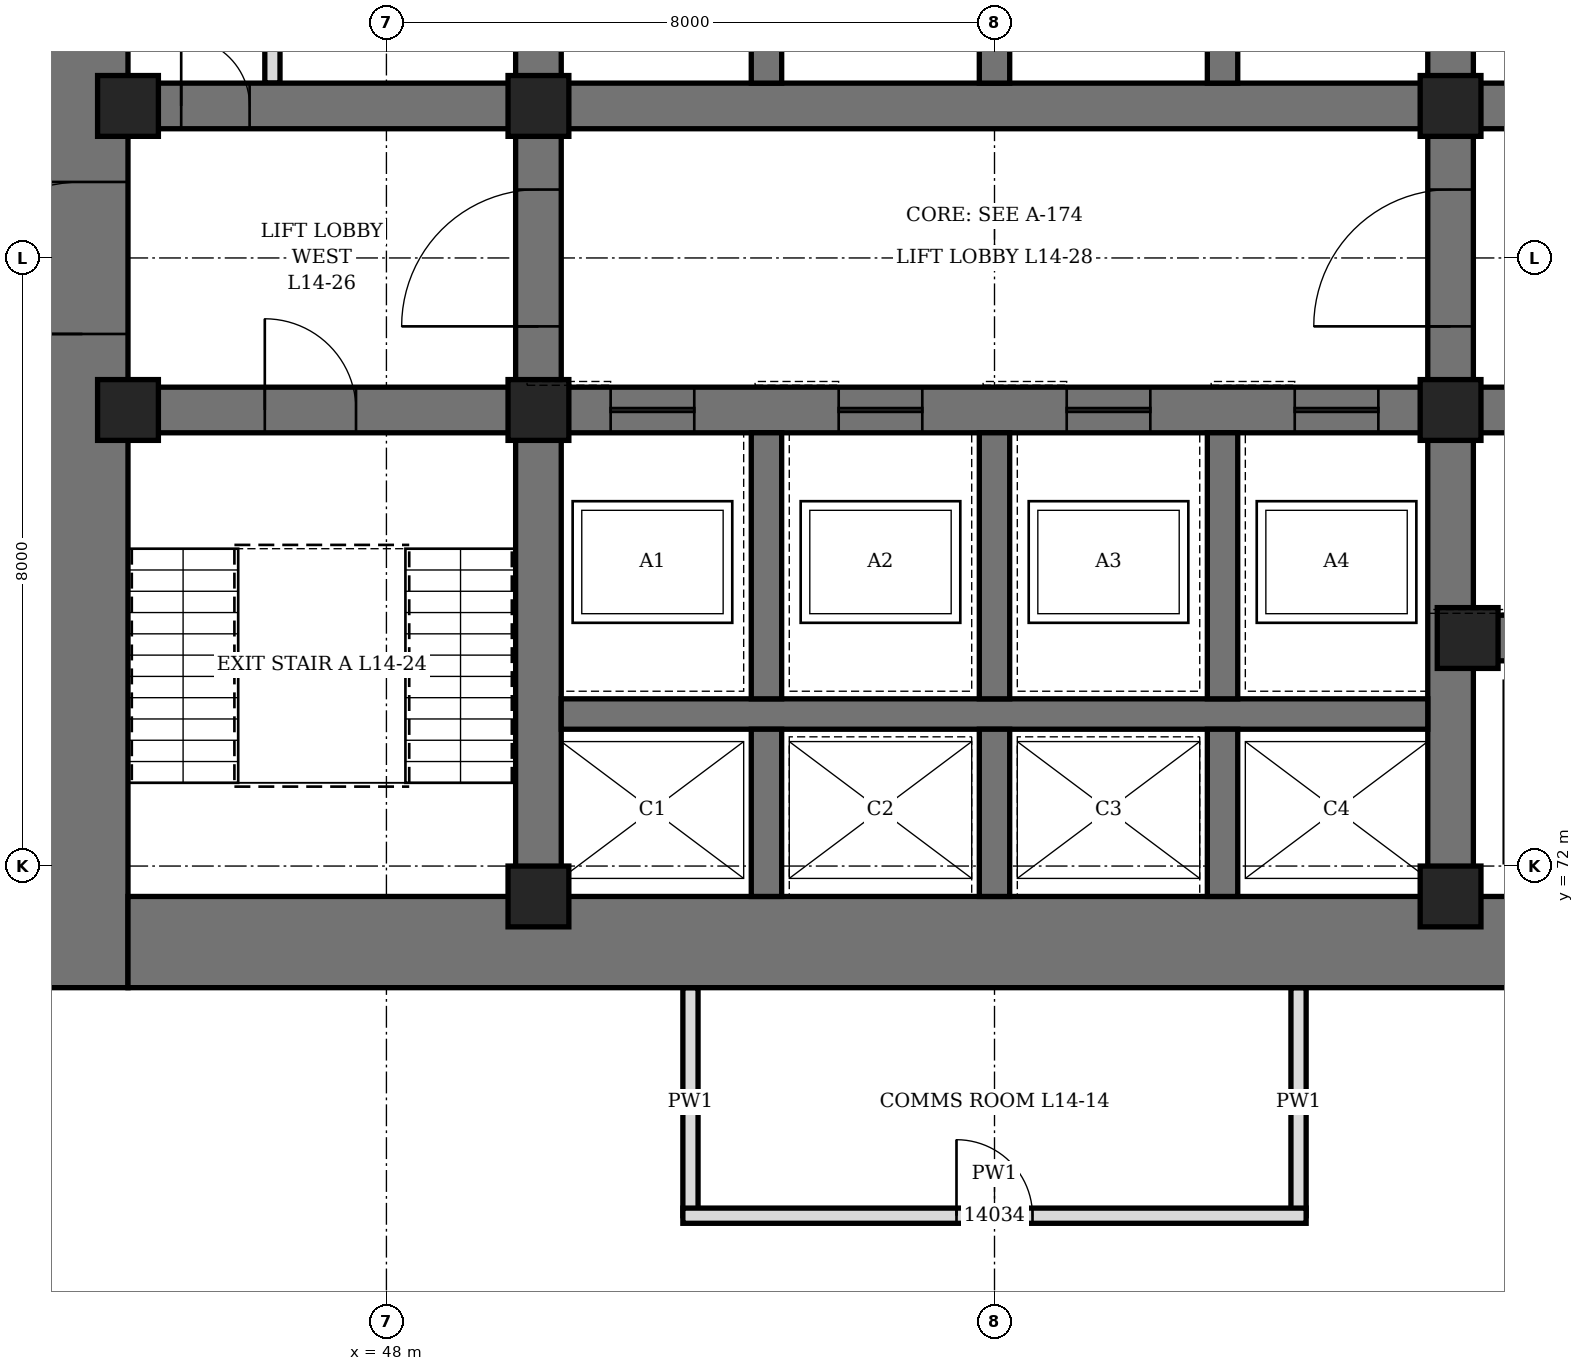
"""IFC4 building model, lengths in metres.
Left out: names, types, materials, properties, quantities, classifications, styles, units other than length and angle.
Written with IfcOpenShell. Run it as: python <this file> out.ifc"""

import sys

from ifc_helpers import new_model, si_unit, direction, frame, frame_2d, origin, origin_2d, place, context, subcontext, project, spatial, rectangle, hollow_rectangle, extrude, element, fill, save


model = new_model("IFC4")
c1 = context("Model", 3, precision=1e-05, world=origin(), true_north=direction((0.0, 1.0)))
c2 = subcontext(c1, "Body", "Model", "MODEL_VIEW")
j1 = project(units=[si_unit("LENGTHUNIT", "METRE"), si_unit("PLANEANGLEUNIT", "RADIAN")], contexts=[c1])
p1 = place(None, origin())
s1 = spatial("IfcSite", under=j1, at=p1, CompositionType="ELEMENT")
p2 = place(p1, origin())
s2 = spatial("IfcBuilding", under=s1, at=p2, CompositionType="ELEMENT")
p3 = place(p2, frame((0.0, 0.0, 68.5)))
s3 = spatial("IfcBuildingStorey", under=s2, at=p3, CompositionType="ELEMENT", Elevation=68.5)
p4 = place(p3, frame((44.0, 70.4, 0.0), z_axis=(0.0, 0.0, 1.0), x_axis=(0.0, 1.0, 0.0)))
e1 = element("IfcWall", 1, at=p4, inside=s3, PredefinedType="SHEAR", context=c2, shape_type="SweptSolid", body=[
    extrude(rectangle(XDim=19.2, YDim=1.2, at=frame_2d((9.6, 0.0))), origin(), (0.0, 0.0, 1.0), 4.2),
])
p5 = place(p4, frame((8.6, 0.0, 0.0)))
e2 = element("IfcOpeningElement", 2, at=p5, cuts=e1, PredefinedType="OPENING", context=c2, shape_type="SweptSolid", body=[
    extrude(rectangle(XDim=2.0, YDim=2.4, at=frame_2d((1.0, 1.2))), frame((0.0, 0.61, 0.0), z_axis=(0.0, -1.0, 0.0), x_axis=(1.0, 0.0, 0.0)), (0.0, 0.0, 1.0), 1.22),
])
p6 = place(p3, frame((44.6, 71.0, 0.0), z_axis=(0.0, 0.0, 1.0), x_axis=(1.0, 0.0, 0.0)))
e3 = element("IfcWall", 3, at=p6, inside=s3, PredefinedType="SHEAR", context=c2, shape_type="SweptSolid", body=[
    extrude(rectangle(XDim=22.8, YDim=1.2, at=frame_2d((11.4, 0.0))), origin(), (0.0, 0.0, 1.0), 4.2),
])
p7 = place(p3, frame((50.0, 71.6, 0.0), z_axis=(0.0, 0.0, 1.0), x_axis=(0.0, 1.0, 0.0)))
e4 = element("IfcWall", 4, at=p7, inside=s3, PredefinedType="SHEAR", context=c2, shape_type="SweptSolid", body=[
    extrude(rectangle(XDim=16.8, YDim=0.6, at=frame_2d((8.4, 0.0))), origin(), (0.0, 0.0, 1.0), 4.2),
])
p8 = place(p7, frame((7.5, 0.0, 0.0)))
e5 = element("IfcOpeningElement", 5, at=p8, cuts=e4, PredefinedType="OPENING", context=c2, shape_type="SweptSolid", body=[
    extrude(rectangle(XDim=1.8, YDim=2.4, at=frame_2d((0.9, 1.2))), frame((0.0, 0.31, 0.0), z_axis=(0.0, -1.0, 0.0), x_axis=(1.0, 0.0, 0.0)), (0.0, 0.0, 1.0), 0.62),
])
p9 = place(p3, frame((62.0, 71.6, 0.0), z_axis=(0.0, 0.0, 1.0), x_axis=(0.0, 1.0, 0.0)))
e6 = element("IfcWall", 6, at=p9, inside=s3, PredefinedType="SHEAR", context=c2, shape_type="SweptSolid", body=[
    extrude(rectangle(XDim=16.8, YDim=0.6, at=frame_2d((8.4, 0.0))), origin(), (0.0, 0.0, 1.0), 4.2),
])
p10 = place(p9, frame((7.5, 0.0, 0.0)))
e7 = element("IfcOpeningElement", 7, at=p10, cuts=e6, PredefinedType="OPENING", context=c2, shape_type="SweptSolid", body=[
    extrude(rectangle(XDim=1.8, YDim=2.4, at=frame_2d((0.9, 1.2))), frame((0.0, 0.31, 0.0), z_axis=(0.0, -1.0, 0.0), x_axis=(1.0, 0.0, 0.0)), (0.0, 0.0, 1.0), 0.62),
])
p11 = place(p3, frame((44.6, 78.0, 0.0), z_axis=(0.0, 0.0, 1.0), x_axis=(1.0, 0.0, 0.0)))
e8 = element("IfcWall", 8, at=p11, inside=s3, PredefinedType="SHEAR", context=c2, shape_type="SweptSolid", body=[
    extrude(rectangle(XDim=5.1, YDim=0.6, at=frame_2d((2.55, 0.0))), origin(), (0.0, 0.0, 1.0), 4.2),
])
p12 = place(p11, frame((1.8, 0.0, 0.0)))
e9 = element("IfcOpeningElement", 9, at=p12, cuts=e8, PredefinedType="OPENING", context=c2, shape_type="SweptSolid", body=[
    extrude(rectangle(XDim=1.2, YDim=2.1, at=frame_2d((0.6, 1.05))), frame((0.0, 0.31, 0.0), z_axis=(0.0, -1.0, 0.0), x_axis=(1.0, 0.0, 0.0)), (0.0, 0.0, 1.0), 0.62),
])
p13 = place(p3, frame((44.6, 82.0, 0.0), z_axis=(0.0, 0.0, 1.0), x_axis=(1.0, 0.0, 0.0)))
e10 = element("IfcWall", 10, at=p13, inside=s3, PredefinedType="SHEAR", context=c2, shape_type="SweptSolid", body=[
    extrude(rectangle(XDim=5.1, YDim=0.6, at=frame_2d((2.55, 0.0))), origin(), (0.0, 0.0, 1.0), 4.2),
])
p14 = place(p13, frame((0.7, 0.0, 0.0)))
e11 = element("IfcOpeningElement", 11, at=p14, cuts=e10, PredefinedType="OPENING", context=c2, shape_type="SweptSolid", body=[
    extrude(rectangle(XDim=0.9, YDim=2.1, at=frame_2d((0.45, 1.05))), frame((0.0, 0.31, 0.0), z_axis=(0.0, -1.0, 0.0), x_axis=(1.0, 0.0, 0.0)), (0.0, 0.0, 1.0), 0.62),
])
p15 = place(p3, frame((62.3, 75.0, 0.0), z_axis=(0.0, 0.0, 1.0), x_axis=(1.0, 0.0, 0.0)))
e12 = element("IfcWall", 12, at=p15, inside=s3, PredefinedType="SHEAR", context=c2, shape_type="SweptSolid", body=[
    extrude(rectangle(XDim=5.1, YDim=0.6, at=frame_2d((2.55, 0.0))), origin(), (0.0, 0.0, 1.0), 4.2),
])
p16 = place(p15, frame((0.6, 0.0, 0.0)))
e13 = element("IfcOpeningElement", 13, at=p16, cuts=e12, PredefinedType="OPENING", context=c2, shape_type="SweptSolid", body=[
    extrude(rectangle(XDim=1.2, YDim=2.2, at=frame_2d((0.6, 1.1))), frame((0.0, 0.31, 0.0), z_axis=(0.0, -1.0, 0.0), x_axis=(1.0, 0.0, 0.0)), (0.0, 0.0, 1.0), 0.62),
])
p17 = place(p15, frame((3.35, 0.0, 0.0)))
e14 = element("IfcOpeningElement", 14, at=p17, cuts=e12, PredefinedType="OPENING", context=c2, shape_type="SweptSolid", body=[
    extrude(rectangle(XDim=1.2, YDim=2.2, at=frame_2d((0.6, 1.1))), frame((0.0, 0.31, 0.0), z_axis=(0.0, -1.0, 0.0), x_axis=(1.0, 0.0, 0.0)), (0.0, 0.0, 1.0), 0.62),
])
p18 = place(p3, frame((62.3, 78.0, 0.0), z_axis=(0.0, 0.0, 1.0), x_axis=(1.0, 0.0, 0.0)))
e15 = element("IfcWall", 15, at=p18, inside=s3, PredefinedType="SHEAR", context=c2, shape_type="SweptSolid", body=[
    extrude(rectangle(XDim=5.1, YDim=0.6, at=frame_2d((2.55, 0.0))), origin(), (0.0, 0.0, 1.0), 4.2),
])
p19 = place(p18, frame((2.1, 0.0, 0.0)))
e16 = element("IfcOpeningElement", 16, at=p19, cuts=e15, PredefinedType="OPENING", context=c2, shape_type="SweptSolid", body=[
    extrude(rectangle(XDim=1.2, YDim=2.1, at=frame_2d((0.6, 1.05))), frame((0.0, 0.31, 0.0), z_axis=(0.0, -1.0, 0.0), x_axis=(1.0, 0.0, 0.0)), (0.0, 0.0, 1.0), 0.62),
])
p20 = place(p3, frame((62.3, 82.0, 0.0), z_axis=(0.0, 0.0, 1.0), x_axis=(1.0, 0.0, 0.0)))
e17 = element("IfcWall", 17, at=p20, inside=s3, PredefinedType="SHEAR", context=c2, shape_type="SweptSolid", body=[
    extrude(rectangle(XDim=5.1, YDim=0.6, at=frame_2d((2.55, 0.0))), origin(), (0.0, 0.0, 1.0), 4.2),
])
p21 = place(p20, frame((2.1, 0.0, 0.0)))
e18 = element("IfcOpeningElement", 18, at=p21, cuts=e17, PredefinedType="OPENING", context=c2, shape_type="SweptSolid", body=[
    extrude(rectangle(XDim=1.2, YDim=2.1, at=frame_2d((0.6, 1.05))), frame((0.0, 0.31, 0.0), z_axis=(0.0, -1.0, 0.0), x_axis=(1.0, 0.0, 0.0)), (0.0, 0.0, 1.0), 0.62),
])
p22 = place(p3, frame((50.3, 78.0, 0.0), z_axis=(0.0, 0.0, 1.0), x_axis=(1.0, 0.0, 0.0)))
e19 = element("IfcWall", 19, at=p22, inside=s3, PredefinedType="SHEAR", context=c2, shape_type="SweptSolid", body=[
    extrude(rectangle(XDim=11.4, YDim=0.6, at=frame_2d((5.7, 0.0))), origin(), (0.0, 0.0, 1.0), 4.2),
])
p23 = place(p22, frame((0.65, 0.0, 0.0)))
e20 = element("IfcOpeningElement", 20, at=p23, cuts=e19, PredefinedType="OPENING", context=c2, shape_type="SweptSolid", body=[
    extrude(rectangle(XDim=1.1, YDim=2.2, at=frame_2d((0.55, 1.1))), frame((0.0, 0.31, 0.0), z_axis=(0.0, -1.0, 0.0), x_axis=(1.0, 0.0, 0.0)), (0.0, 0.0, 1.0), 0.62),
])
p24 = place(p22, frame((3.65, 0.0, 0.0)))
e21 = element("IfcOpeningElement", 21, at=p24, cuts=e19, PredefinedType="OPENING", context=c2, shape_type="SweptSolid", body=[
    extrude(rectangle(XDim=1.1, YDim=2.2, at=frame_2d((0.55, 1.1))), frame((0.0, 0.31, 0.0), z_axis=(0.0, -1.0, 0.0), x_axis=(1.0, 0.0, 0.0)), (0.0, 0.0, 1.0), 0.62),
])
p25 = place(p22, frame((6.65, 0.0, 0.0)))
e22 = element("IfcOpeningElement", 22, at=p25, cuts=e19, PredefinedType="OPENING", context=c2, shape_type="SweptSolid", body=[
    extrude(rectangle(XDim=1.1, YDim=2.2, at=frame_2d((0.55, 1.1))), frame((0.0, 0.31, 0.0), z_axis=(0.0, -1.0, 0.0), x_axis=(1.0, 0.0, 0.0)), (0.0, 0.0, 1.0), 0.62),
])
p26 = place(p22, frame((9.65, 0.0, 0.0)))
e23 = element("IfcOpeningElement", 23, at=p26, cuts=e19, PredefinedType="OPENING", context=c2, shape_type="SweptSolid", body=[
    extrude(rectangle(XDim=1.1, YDim=2.2, at=frame_2d((0.55, 1.1))), frame((0.0, 0.31, 0.0), z_axis=(0.0, -1.0, 0.0), x_axis=(1.0, 0.0, 0.0)), (0.0, 0.0, 1.0), 0.62),
])
p27 = place(p3, frame((50.3, 82.0, 0.0), z_axis=(0.0, 0.0, 1.0), x_axis=(1.0, 0.0, 0.0)))
e24 = element("IfcWall", 24, at=p27, inside=s3, PredefinedType="SHEAR", context=c2, shape_type="SweptSolid", body=[
    extrude(rectangle(XDim=11.4, YDim=0.6, at=frame_2d((5.7, 0.0))), origin(), (0.0, 0.0, 1.0), 4.2),
])
p28 = place(p3, frame((50.3, 74.0, 0.0), z_axis=(0.0, 0.0, 1.0), x_axis=(1.0, 0.0, 0.0)))
e25 = element("IfcWall", 25, at=p28, inside=s3, PredefinedType="SHEAR", context=c2, shape_type="SweptSolid", body=[
    extrude(rectangle(XDim=11.4, YDim=0.4, at=frame_2d((5.7, 0.0))), origin(), (0.0, 0.0, 1.0), 4.2),
])
p29 = place(p3, frame((53.0, 71.6, 0.0), z_axis=(0.0, 0.0, 1.0), x_axis=(0.0, 1.0, 0.0)))
e26 = element("IfcWall", 26, at=p29, inside=s3, PredefinedType="SHEAR", context=c2, shape_type="SweptSolid", body=[
    extrude(rectangle(XDim=2.2, YDim=0.4, at=frame_2d((1.1, 0.0))), origin(), (0.0, 0.0, 1.0), 4.2),
])
p30 = place(p3, frame((53.0, 74.2, 0.0), z_axis=(0.0, 0.0, 1.0), x_axis=(0.0, 1.0, 0.0)))
e27 = element("IfcWall", 27, at=p30, inside=s3, PredefinedType="SHEAR", context=c2, shape_type="SweptSolid", body=[
    extrude(rectangle(XDim=3.5, YDim=0.4, at=frame_2d((1.75, 0.0))), origin(), (0.0, 0.0, 1.0), 4.2),
])
p31 = place(p3, frame((53.0, 82.3, 0.0), z_axis=(0.0, 0.0, 1.0), x_axis=(0.0, 1.0, 0.0)))
e28 = element("IfcWall", 28, at=p31, inside=s3, PredefinedType="SHEAR", context=c2, shape_type="SweptSolid", body=[
    extrude(rectangle(XDim=3.4, YDim=0.4, at=frame_2d((1.7, 0.0))), origin(), (0.0, 0.0, 1.0), 4.2),
])
p32 = place(p3, frame((56.0, 71.6, 0.0), z_axis=(0.0, 0.0, 1.0), x_axis=(0.0, 1.0, 0.0)))
e29 = element("IfcWall", 29, at=p32, inside=s3, PredefinedType="SHEAR", context=c2, shape_type="SweptSolid", body=[
    extrude(rectangle(XDim=2.2, YDim=0.4, at=frame_2d((1.1, 0.0))), origin(), (0.0, 0.0, 1.0), 4.2),
])
p33 = place(p3, frame((56.0, 74.2, 0.0), z_axis=(0.0, 0.0, 1.0), x_axis=(0.0, 1.0, 0.0)))
e30 = element("IfcWall", 30, at=p33, inside=s3, PredefinedType="SHEAR", context=c2, shape_type="SweptSolid", body=[
    extrude(rectangle(XDim=3.5, YDim=0.4, at=frame_2d((1.75, 0.0))), origin(), (0.0, 0.0, 1.0), 4.2),
])
p34 = place(p3, frame((56.0, 82.3, 0.0), z_axis=(0.0, 0.0, 1.0), x_axis=(0.0, 1.0, 0.0)))
e31 = element("IfcWall", 31, at=p34, inside=s3, PredefinedType="SHEAR", context=c2, shape_type="SweptSolid", body=[
    extrude(rectangle(XDim=3.4, YDim=0.4, at=frame_2d((1.7, 0.0))), origin(), (0.0, 0.0, 1.0), 4.2),
])
p35 = place(p3, frame((59.0, 71.6, 0.0), z_axis=(0.0, 0.0, 1.0), x_axis=(0.0, 1.0, 0.0)))
e32 = element("IfcWall", 32, at=p35, inside=s3, PredefinedType="SHEAR", context=c2, shape_type="SweptSolid", body=[
    extrude(rectangle(XDim=2.2, YDim=0.4, at=frame_2d((1.1, 0.0))), origin(), (0.0, 0.0, 1.0), 4.2),
])
p36 = place(p3, frame((59.0, 74.2, 0.0), z_axis=(0.0, 0.0, 1.0), x_axis=(0.0, 1.0, 0.0)))
e33 = element("IfcWall", 33, at=p36, inside=s3, PredefinedType="SHEAR", context=c2, shape_type="SweptSolid", body=[
    extrude(rectangle(XDim=3.5, YDim=0.4, at=frame_2d((1.75, 0.0))), origin(), (0.0, 0.0, 1.0), 4.2),
])
p37 = place(p3, frame((59.0, 82.3, 0.0), z_axis=(0.0, 0.0, 1.0), x_axis=(0.0, 1.0, 0.0)))
e34 = element("IfcWall", 34, at=p37, inside=s3, PredefinedType="SHEAR", context=c2, shape_type="SweptSolid", body=[
    extrude(rectangle(XDim=3.4, YDim=0.4, at=frame_2d((1.7, 0.0))), origin(), (0.0, 0.0, 1.0), 4.2),
])
for number, where, z_axis, x_axis in (
    (35, (44.6, 78.0, 0.0), (0.0, 0.0, 1.0), (1.0, 0.0, 0.0)),
    (36, (44.6, 82.0, 0.0), (0.0, 0.0, 1.0), (1.0, 0.0, 0.0)),
    (37, (50.0, 71.6, 0.0), (0.0, 0.0, 1.0), (1.0, 0.0, 0.0)),
    (38, (50.0, 78.0, 0.0), (0.0, 0.0, 1.0), (1.0, 0.0, 0.0)),
    (39, (50.0, 82.0, 0.0), (0.0, 0.0, 1.0), (1.0, 0.0, 0.0)),
    (40, (62.0, 71.6, 0.0), (0.0, 0.0, 1.0), (1.0, 0.0, 0.0)),
    (41, (62.0, 78.0, 0.0), (0.0, 0.0, 1.0), (1.0, 0.0, 0.0)),
    (42, (62.0, 82.0, 0.0), (0.0, 0.0, 1.0), (1.0, 0.0, 0.0)),
    (43, (62.225, 75.0, 0.0), (0.0, 0.0, 1.0), (1.0, 0.0, 0.0)),
):
    element("IfcColumn", number, at=place(p3, frame(where, z_axis=z_axis, x_axis=x_axis)), inside=s3, PredefinedType="COLUMN", context=c2, shape_type="SweptSolid", body=[
        extrude(hollow_rectangle(XDim=0.8, YDim=0.8, WallThickness=0.1, at=origin_2d()), origin(), (0.0, 0.0, 1.0), 4.2),
    ])
p38 = place(p3, frame((46.5, 82.3, 0.0), z_axis=(0.0, 0.0, 1.0), x_axis=(0.0, 1.0, 0.0)))
e44 = element("IfcWall", 44, at=p38, inside=s3, PredefinedType="PARTITIONING", context=c2, shape_type="SweptSolid", body=[
    extrude(rectangle(XDim=2.9, YDim=0.2, at=frame_2d((1.45, 0.0))), origin(), (0.0, 0.0, 1.0), 4.04),
])
p39 = place(p38, frame((1.0, 0.0, 0.0)))
e45 = element("IfcOpeningElement", 45, at=p39, cuts=e44, PredefinedType="OPENING", context=c2, shape_type="SweptSolid", body=[
    extrude(rectangle(XDim=0.9, YDim=2.1, at=frame_2d((0.45, 1.05))), frame((0.0, 0.11, 0.0), z_axis=(0.0, -1.0, 0.0), x_axis=(1.0, 0.0, 0.0)), (0.0, 0.0, 1.0), 0.22),
])
for number, where, z_axis, x_axis in (
    (46, (52.0, 67.4, 0.0), (0.0, 0.0, 1.0), (0.0, 1.0, 0.0)),
    (47, (60.0, 67.4, 0.0), (0.0, 0.0, 1.0), (0.0, 1.0, 0.0)),
):
    element("IfcWall", number, at=place(p3, frame(where, z_axis=z_axis, x_axis=x_axis)), inside=s3, PredefinedType="PARTITIONING", context=c2, shape_type="SweptSolid", body=[
        extrude(rectangle(XDim=3.0, YDim=0.2, at=frame_2d((1.5, 0.0))), origin(), (0.0, 0.0, 1.0), 4.04),
    ])
p40 = place(p3, frame((51.9, 67.4, 0.0), z_axis=(0.0, 0.0, 1.0), x_axis=(1.0, 0.0, 0.0)))
e48 = element("IfcWall", 48, at=p40, inside=s3, PredefinedType="PARTITIONING", context=c2, shape_type="SweptSolid", body=[
    extrude(rectangle(XDim=8.2, YDim=0.2, at=frame_2d((4.1, 0.0))), origin(), (0.0, 0.0, 1.0), 4.04),
])
p41 = place(p40, frame((3.6, 0.0, 0.0)))
e49 = element("IfcOpeningElement", 49, at=p41, cuts=e48, PredefinedType="OPENING", context=c2, shape_type="SweptSolid", body=[
    extrude(rectangle(XDim=1.0, YDim=2.1, at=frame_2d((0.5, 1.05))), frame((0.0, 0.11, 0.0), z_axis=(0.0, -1.0, 0.0), x_axis=(1.0, 0.0, 0.0)), (0.0, 0.0, 1.0), 0.22),
])
p42 = place(p14, origin())
e50 = element("IfcDoor", 50, at=p42, inside=s3, OperationType="SINGLE_SWING_LEFT", PredefinedType="DOOR", context=c2, shape_type="SweptSolid", body=[
    extrude(rectangle(XDim=0.9, YDim=2.1, at=frame_2d((0.45, 1.05))), frame((0.0, 0.3, 0.0), z_axis=(0.0, -1.0, 0.0), x_axis=(1.0, 0.0, 0.0)), (0.0, 0.0, 1.0), 0.6),
])
fill(e11, e50)
p43 = place(p12, origin())
e51 = element("IfcDoor", 51, at=p43, inside=s3, OperationType="SINGLE_SWING_LEFT", PredefinedType="DOOR", context=c2, shape_type="SweptSolid", body=[
    extrude(rectangle(XDim=1.2, YDim=2.1, at=frame_2d((0.6, 1.05))), frame((0.0, 0.3, 0.0), z_axis=(0.0, -1.0, 0.0), x_axis=(1.0, 0.0, 0.0)), (0.0, 0.0, 1.0), 0.6),
])
fill(e9, e51)
p44 = place(p5, origin())
e52 = element("IfcDoor", 52, at=p44, inside=s3, OperationType="DOUBLE_DOOR_SINGLE_SWING", PredefinedType="DOOR", context=c2, shape_type="SweptSolid", body=[
    extrude(rectangle(XDim=2.0, YDim=2.4, at=frame_2d((1.0, 1.2))), frame((0.0, 0.35, 0.0), z_axis=(0.0, -1.0, 0.0), x_axis=(1.0, 0.0, 0.0)), (0.0, 0.0, 1.0), 0.7),
])
fill(e2, e52)
p45 = place(p8, origin())
e53 = element("IfcDoor", 53, at=p45, inside=s3, OperationType="DOUBLE_DOOR_SINGLE_SWING", PredefinedType="DOOR", context=c2, shape_type="SweptSolid", body=[
    extrude(rectangle(XDim=1.8, YDim=2.4, at=frame_2d((0.9, 1.2))), frame((0.0, 0.3, 0.0), z_axis=(0.0, -1.0, 0.0), x_axis=(1.0, 0.0, 0.0)), (0.0, 0.0, 1.0), 0.6),
])
fill(e5, e53)
p46 = place(p10, origin())
e54 = element("IfcDoor", 54, at=p46, inside=s3, OperationType="DOUBLE_DOOR_SINGLE_SWING", PredefinedType="DOOR", context=c2, shape_type="SweptSolid", body=[
    extrude(rectangle(XDim=1.8, YDim=2.4, at=frame_2d((0.9, 1.2))), frame((0.0, 0.3, 0.0), z_axis=(0.0, -1.0, 0.0), x_axis=(1.0, 0.0, 0.0)), (0.0, 0.0, 1.0), 0.6),
])
fill(e7, e54)
p47 = place(p23, origin())
e55 = element("IfcDoor", 55, at=p47, inside=s3, OperationType="SLIDING_TO_LEFT", PredefinedType="DOOR", context=c2, shape_type="SweptSolid", body=[
    extrude(rectangle(XDim=1.1, YDim=2.2, at=frame_2d((0.55, 1.1))), frame((0.0, 0.3, 0.0), z_axis=(0.0, -1.0, 0.0), x_axis=(1.0, 0.0, 0.0)), (0.0, 0.0, 1.0), 0.6),
])
fill(e20, e55)
p48 = place(p24, origin())
e56 = element("IfcDoor", 56, at=p48, inside=s3, OperationType="SLIDING_TO_LEFT", PredefinedType="DOOR", context=c2, shape_type="SweptSolid", body=[
    extrude(rectangle(XDim=1.1, YDim=2.2, at=frame_2d((0.55, 1.1))), frame((0.0, 0.3, 0.0), z_axis=(0.0, -1.0, 0.0), x_axis=(1.0, 0.0, 0.0)), (0.0, 0.0, 1.0), 0.6),
])
fill(e21, e56)
p49 = place(p25, origin())
e57 = element("IfcDoor", 57, at=p49, inside=s3, OperationType="SLIDING_TO_LEFT", PredefinedType="DOOR", context=c2, shape_type="SweptSolid", body=[
    extrude(rectangle(XDim=1.1, YDim=2.2, at=frame_2d((0.55, 1.1))), frame((0.0, 0.3, 0.0), z_axis=(0.0, -1.0, 0.0), x_axis=(1.0, 0.0, 0.0)), (0.0, 0.0, 1.0), 0.6),
])
fill(e22, e57)
p50 = place(p26, origin())
e58 = element("IfcDoor", 58, at=p50, inside=s3, OperationType="SLIDING_TO_LEFT", PredefinedType="DOOR", context=c2, shape_type="SweptSolid", body=[
    extrude(rectangle(XDim=1.1, YDim=2.2, at=frame_2d((0.55, 1.1))), frame((0.0, 0.3, 0.0), z_axis=(0.0, -1.0, 0.0), x_axis=(1.0, 0.0, 0.0)), (0.0, 0.0, 1.0), 0.6),
])
fill(e23, e58)
p51 = place(p41, origin())
e59 = element("IfcDoor", 59, at=p51, inside=s3, OperationType="SINGLE_SWING_LEFT", PredefinedType="DOOR", context=c2, shape_type="SweptSolid", body=[
    extrude(rectangle(XDim=1.0, YDim=2.1, at=frame_2d((0.5, 1.05))), frame((0.0, 0.1, 0.0), z_axis=(0.0, -1.0, 0.0), x_axis=(1.0, 0.0, 0.0)), (0.0, 0.0, 1.0), 0.199),
])
fill(e49, e59)
save(model, sys.argv[1])
